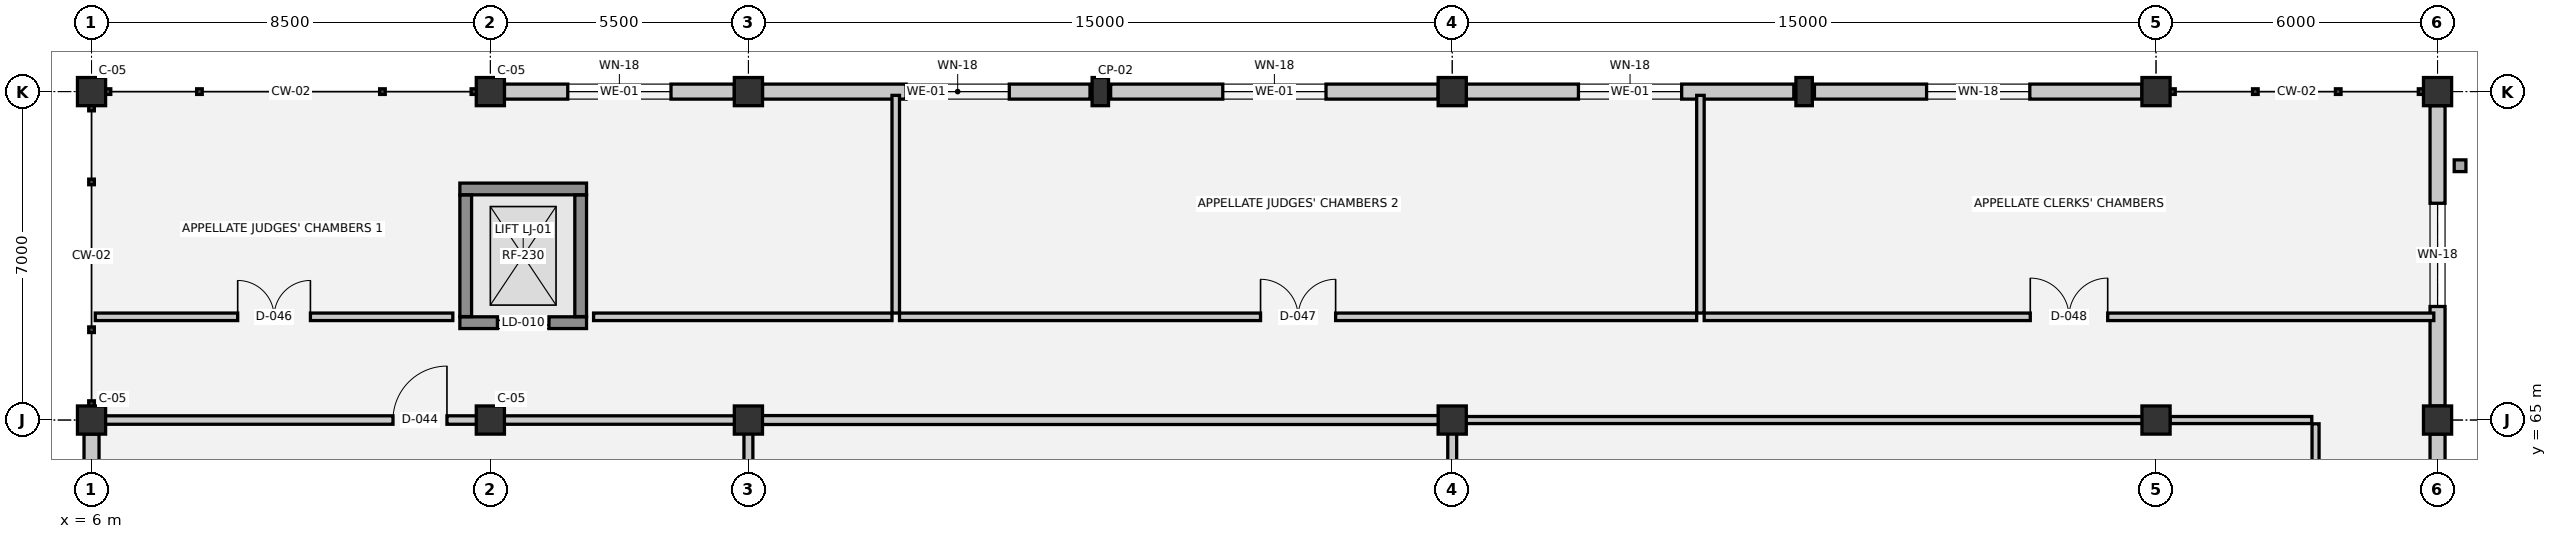
"""IFC4 building model, lengths in metres.
Left out: names, types, materials, properties, quantities, classifications, styles, units other than length and angle.
Written with IfcOpenShell. Run it as: python <this file> out.ifc"""

import sys

from ifc_helpers import new_model, si_unit, direction, frame, frame_2d, origin, origin_2d, place, context, subcontext, project, spatial, rectangle, extrude, element, fill, save


model = new_model("IFC4")
c1 = context("Model", 3, precision=1e-05, world=origin(), true_north=direction((0.0, 1.0)))
c2 = subcontext(c1, "Body", "Model", "MODEL_VIEW")
j1 = project(units=[si_unit("LENGTHUNIT", "METRE"), si_unit("PLANEANGLEUNIT", "RADIAN")], contexts=[c1])
p1 = place(None, origin())
s1 = spatial("IfcSite", under=j1, at=p1, CompositionType="ELEMENT")
p2 = place(p1, origin())
s2 = spatial("IfcBuilding", under=s1, at=p2, CompositionType="ELEMENT")
p3 = place(p2, frame((0.0, 0.0, 14.4)))
s3 = spatial("IfcBuildingStorey", under=s2, at=p3, CompositionType="ELEMENT", Elevation=14.4)
for number, where, z_axis, x_axis in (
    (1, (6.0, 65.0, 0.0), (0.0, 0.0, 1.0), (1.0, 0.0, 0.0)),
    (2, (6.0, 72.0, 0.0), (0.0, 0.0, 1.0), (1.0, 0.0, 0.0)),
    (3, (14.5, 65.0, 0.0), (0.0, 0.0, 1.0), (1.0, 0.0, 0.0)),
    (4, (14.5, 72.0, 0.0), (0.0, 0.0, 1.0), (1.0, 0.0, 0.0)),
    (5, (20.0, 65.0, 0.0), (0.0, 0.0, 1.0), (1.0, 0.0, 0.0)),
    (6, (20.0, 72.0, 0.0), (0.0, 0.0, 1.0), (1.0, 0.0, 0.0)),
    (7, (35.0, 65.0, 0.0), (0.0, 0.0, 1.0), (1.0, 0.0, 0.0)),
    (8, (35.0, 72.0, 0.0), (0.0, 0.0, 1.0), (1.0, 0.0, 0.0)),
    (9, (50.0, 65.0, 0.0), (0.0, 0.0, 1.0), (1.0, 0.0, 0.0)),
    (10, (50.0, 72.0, 0.0), (0.0, 0.0, 1.0), (1.0, 0.0, 0.0)),
    (11, (56.0, 65.0, 0.0), (0.0, 0.0, 1.0), (1.0, 0.0, 0.0)),
    (12, (56.0, 72.0, 0.0), (0.0, 0.0, 1.0), (1.0, 0.0, 0.0)),
):
    element("IfcColumn", number, at=place(p3, frame(where, z_axis=z_axis, x_axis=x_axis)), inside=s3, PredefinedType="COLUMN", context=c2, shape_type="SweptSolid", body=[
        extrude(rectangle(XDim=0.6, YDim=0.6, at=origin_2d()), origin(), (0.0, 0.0, 1.0), 3.9),
    ])
for number, where, z_axis, x_axis in (
    (13, (27.5, 72.0, 0.0), (0.0, 0.0, 1.0), (1.0, 0.0, 0.0)),
    (14, (42.5, 72.0, 0.0), (0.0, 0.0, 1.0), (1.0, 0.0, 0.0)),
):
    element("IfcColumn", number, at=place(p3, frame(where, z_axis=z_axis, x_axis=x_axis)), inside=s3, PredefinedType="PILASTER", context=c2, shape_type="SweptSolid", body=[
        extrude(rectangle(XDim=0.35, YDim=0.6, at=origin_2d()), origin(), (0.0, 0.0, 1.0), 3.9),
    ])
p4 = place(p3, frame((6.0, 51.3, 0.0), z_axis=(0.0, 0.0, 1.0), x_axis=(0.0, 1.0, 0.0)))
e15 = element("IfcWall", 15, at=p4, inside=s3, PredefinedType="SOLIDWALL", context=c2, shape_type="SweptSolid", body=[
    extrude(rectangle(XDim=13.4, YDim=0.32, at=frame_2d((6.7, 0.0))), origin(), (0.0, 0.0, 1.0), 2.46),
])
p5 = place(p4, frame((5.6, 0.0, 0.9)))
e16 = element("IfcOpeningElement", 16, at=p5, cuts=e15, PredefinedType="OPENING", context=c2, shape_type="SweptSolid", body=[
    extrude(rectangle(XDim=2.2, YDim=1.0, at=frame_2d((1.1, 0.5))), frame((0.0, 0.17, 0.0), z_axis=(0.0, -1.0, 0.0), x_axis=(1.0, 0.0, 0.0)), (0.0, 0.0, 1.0), 0.34),
])
p6 = place(p3, frame((14.8, 72.0, 0.0), z_axis=(0.0, 0.0, 1.0), x_axis=(1.0, 0.0, 0.0)))
e17 = element("IfcWall", 17, at=p6, inside=s3, PredefinedType="SOLIDWALL", context=c2, shape_type="SweptSolid", body=[
    extrude(rectangle(XDim=4.9, YDim=0.32, at=frame_2d((2.45, 0.0))), origin(), (0.0, 0.0, 1.0), 2.46),
])
p7 = place(p6, frame((1.35, 0.0, 0.9)))
e18 = element("IfcOpeningElement", 18, at=p7, cuts=e17, PredefinedType="OPENING", context=c2, shape_type="SweptSolid", body=[
    extrude(rectangle(XDim=2.2, YDim=1.0, at=frame_2d((1.1, 0.5))), frame((0.0, 0.17, 0.0), z_axis=(0.0, -1.0, 0.0), x_axis=(1.0, 0.0, 0.0)), (0.0, 0.0, 1.0), 0.34),
])
p8 = place(p3, frame((20.3, 72.0, 0.0), z_axis=(0.0, 0.0, 1.0), x_axis=(1.0, 0.0, 0.0)))
e19 = element("IfcWall", 19, at=p8, inside=s3, PredefinedType="SOLIDWALL", context=c2, shape_type="SweptSolid", body=[
    extrude(rectangle(XDim=6.98, YDim=0.32, at=frame_2d((3.49, 0.0))), origin(), (0.0, 0.0, 1.0), 2.46),
])
p9 = place(p8, frame((3.06, 0.0, 0.9)))
e20 = element("IfcOpeningElement", 20, at=p9, cuts=e19, PredefinedType="OPENING", context=c2, shape_type="SweptSolid", body=[
    extrude(rectangle(XDim=2.2, YDim=1.0, at=frame_2d((1.1, 0.5))), frame((0.0, 0.17, 0.0), z_axis=(0.0, -1.0, 0.0), x_axis=(1.0, 0.0, 0.0)), (0.0, 0.0, 1.0), 0.34),
])
p10 = place(p3, frame((27.72, 72.0, 0.0), z_axis=(0.0, 0.0, 1.0), x_axis=(1.0, 0.0, 0.0)))
e21 = element("IfcWall", 21, at=p10, inside=s3, PredefinedType="SOLIDWALL", context=c2, shape_type="SweptSolid", body=[
    extrude(rectangle(XDim=6.98, YDim=0.32, at=frame_2d((3.49, 0.0))), origin(), (0.0, 0.0, 1.0), 2.46),
])
p11 = place(p10, frame((2.39, 0.0, 0.9)))
e22 = element("IfcOpeningElement", 22, at=p11, cuts=e21, PredefinedType="OPENING", context=c2, shape_type="SweptSolid", body=[
    extrude(rectangle(XDim=2.2, YDim=1.0, at=frame_2d((1.1, 0.5))), frame((0.0, 0.17, 0.0), z_axis=(0.0, -1.0, 0.0), x_axis=(1.0, 0.0, 0.0)), (0.0, 0.0, 1.0), 0.34),
])
p12 = place(p3, frame((35.3, 72.0, 0.0), z_axis=(0.0, 0.0, 1.0), x_axis=(1.0, 0.0, 0.0)))
e23 = element("IfcWall", 23, at=p12, inside=s3, PredefinedType="SOLIDWALL", context=c2, shape_type="SweptSolid", body=[
    extrude(rectangle(XDim=6.98, YDim=0.32, at=frame_2d((3.49, 0.0))), origin(), (0.0, 0.0, 1.0), 2.46),
])
p13 = place(p12, frame((2.39, 0.0, 0.9)))
e24 = element("IfcOpeningElement", 24, at=p13, cuts=e23, PredefinedType="OPENING", context=c2, shape_type="SweptSolid", body=[
    extrude(rectangle(XDim=2.2, YDim=1.0, at=frame_2d((1.1, 0.5))), frame((0.0, 0.17, 0.0), z_axis=(0.0, -1.0, 0.0), x_axis=(1.0, 0.0, 0.0)), (0.0, 0.0, 1.0), 0.34),
])
p14 = place(p3, frame((42.72, 72.0, 0.0), z_axis=(0.0, 0.0, 1.0), x_axis=(1.0, 0.0, 0.0)))
e25 = element("IfcWall", 25, at=p14, inside=s3, PredefinedType="SOLIDWALL", context=c2, shape_type="SweptSolid", body=[
    extrude(rectangle(XDim=6.98, YDim=0.32, at=frame_2d((3.49, 0.0))), origin(), (0.0, 0.0, 1.0), 2.46),
])
p15 = place(p14, frame((2.39, 0.0, 0.9)))
e26 = element("IfcOpeningElement", 26, at=p15, cuts=e25, PredefinedType="OPENING", context=c2, shape_type="SweptSolid", body=[
    extrude(rectangle(XDim=2.2, YDim=1.0, at=frame_2d((1.1, 0.5))), frame((0.0, 0.17, 0.0), z_axis=(0.0, -1.0, 0.0), x_axis=(1.0, 0.0, 0.0)), (0.0, 0.0, 1.0), 0.34),
])
p16 = place(p3, frame((56.0, 71.7, 0.0), z_axis=(0.0, 0.0, 1.0), x_axis=(0.0, -1.0, 0.0)))
e27 = element("IfcWall", 27, at=p16, inside=s3, PredefinedType="SOLIDWALL", context=c2, shape_type="SweptSolid", body=[
    extrude(rectangle(XDim=6.4, YDim=0.32, at=frame_2d((3.2, 0.0))), origin(), (0.0, 0.0, 1.0), 2.46),
])
p17 = place(p16, frame((2.08, 0.0, 0.9)))
e28 = element("IfcOpeningElement", 28, at=p17, cuts=e27, PredefinedType="OPENING", context=c2, shape_type="SweptSolid", body=[
    extrude(rectangle(XDim=2.2, YDim=1.0, at=frame_2d((1.1, 0.5))), frame((0.0, 0.17, 0.0), z_axis=(0.0, -1.0, 0.0), x_axis=(1.0, 0.0, 0.0)), (0.0, 0.0, 1.0), 0.34),
])
p18 = place(p3, frame((56.0, 64.7, 0.0), z_axis=(0.0, 0.0, 1.0), x_axis=(0.0, -1.0, 0.0)))
e29 = element("IfcWall", 29, at=p18, inside=s3, PredefinedType="SOLIDWALL", context=c2, shape_type="SweptSolid", body=[
    extrude(rectangle(XDim=13.4, YDim=0.32, at=frame_2d((6.7, 0.0))), origin(), (0.0, 0.0, 1.0), 2.46),
])
p19 = place(p18, frame((9.975, 0.0, 0.0)))
e30 = element("IfcOpeningElement", 30, at=p19, cuts=e29, PredefinedType="OPENING", context=c2, shape_type="SweptSolid", body=[
    extrude(rectangle(XDim=1.65, YDim=2.2, at=frame_2d((0.825, 1.1))), frame((0.0, 0.17, 0.0), z_axis=(0.0, -1.0, 0.0), x_axis=(1.0, 0.0, 0.0)), (0.0, 0.0, 1.0), 0.34),
])
p20 = place(p3, frame((13.85, 67.075, 0.0), z_axis=(0.0, 0.0, 1.0), x_axis=(1.0, 0.0, 0.0)))
e31 = element("IfcWall", 31, at=p20, inside=s3, PredefinedType="SHEAR", context=c2, shape_type="SweptSolid", body=[
    extrude(rectangle(XDim=2.7, YDim=0.25, at=frame_2d((1.35, 0.0))), origin(), (0.0, 0.0, 1.0), 3.27),
])
p21 = place(p20, frame((0.8, 0.0, 0.0)))
e32 = element("IfcOpeningElement", 32, at=p21, cuts=e31, PredefinedType="OPENING", context=c2, shape_type="SweptSolid", body=[
    extrude(rectangle(XDim=1.1, YDim=2.15, at=frame_2d((0.55, 1.075))), frame((0.0, 0.135, 0.0), z_axis=(0.0, -1.0, 0.0), x_axis=(1.0, 0.0, 0.0)), (0.0, 0.0, 1.0), 0.27),
])
p22 = place(p3, frame((16.55, 69.925, 0.0), z_axis=(0.0, 0.0, 1.0), x_axis=(-1.0, 0.0, 0.0)))
e33 = element("IfcWall", 33, at=p22, inside=s3, PredefinedType="SHEAR", context=c2, shape_type="SweptSolid", body=[
    extrude(rectangle(XDim=2.7, YDim=0.25, at=frame_2d((1.35, 0.0))), origin(), (0.0, 0.0, 1.0), 3.27),
])
for number, where, z_axis, x_axis in (
    (34, (13.975, 69.795, 0.0), (0.0, 0.0, 1.0), (0.0, -1.0, 0.0)),
    (35, (16.425, 67.205, 0.0), (0.0, 0.0, 1.0), (0.0, 1.0, 0.0)),
):
    element("IfcWall", number, at=place(p3, frame(where, z_axis=z_axis, x_axis=x_axis)), inside=s3, PredefinedType="SHEAR", context=c2, shape_type="SweptSolid", body=[
        extrude(rectangle(XDim=2.59, YDim=0.25, at=frame_2d((1.295, 0.0))), origin(), (0.0, 0.0, 1.0), 3.27),
    ])
p23 = place(p3, frame((6.08, 65.0, 0.0), z_axis=(0.0, 0.0, 1.0), x_axis=(1.0, 0.0, 0.0)))
e36 = element("IfcWall", 36, at=p23, inside=s3, PredefinedType="PARTITIONING", context=c2, shape_type="SweptSolid", body=[
    extrude(rectangle(XDim=13.84, YDim=0.18, at=frame_2d((6.92, 0.0))), origin(), (0.0, 0.0, 1.0), 2.83),
])
p24 = place(p23, frame((6.345, 0.0, 0.0)))
e37 = element("IfcOpeningElement", 37, at=p24, cuts=e36, PredefinedType="OPENING", context=c2, shape_type="SweptSolid", body=[
    extrude(rectangle(XDim=1.15, YDim=2.2, at=frame_2d((0.575, 1.1))), frame((0.0, 0.1, 0.0), z_axis=(0.0, -1.0, 0.0), x_axis=(1.0, 0.0, 0.0)), (0.0, 0.0, 1.0), 0.2),
])
p25 = place(p3, frame((20.08, 65.0, 0.0), z_axis=(0.0, 0.0, 1.0), x_axis=(1.0, 0.0, 0.0)))
e38 = element("IfcWall", 38, at=p25, inside=s3, PredefinedType="PARTITIONING", context=c2, shape_type="SweptSolid", body=[
    extrude(rectangle(XDim=14.84, YDim=0.19, at=frame_2d((7.42, 0.0))), origin(), (0.0, 0.0, 1.0), 2.63),
])
p26 = place(p3, frame((35.08, 65.0, 0.0), z_axis=(0.0, 0.0, 1.0), x_axis=(1.0, 0.0, 0.0)))
e39 = element("IfcWall", 39, at=p26, inside=s3, PredefinedType="PARTITIONING", context=c2, shape_type="SweptSolid", body=[
    extrude(rectangle(XDim=15.22, YDim=0.15, at=frame_2d((7.61, 0.0))), origin(), (0.0, 0.0, 1.0), 2.63),
])
p27 = place(p3, frame((50.3, 65.0, 0.0), z_axis=(0.0, 0.0, 1.0), x_axis=(1.0, 0.0, 0.0)))
e40 = element("IfcWall", 40, at=p27, inside=s3, PredefinedType="PARTITIONING", context=c2, shape_type="SweptSolid", body=[
    extrude(rectangle(XDim=3.02, YDim=0.15, at=frame_2d((1.51, 0.0))), origin(), (0.0, 0.0, 1.0), 2.83),
])
p28 = place(p3, frame((6.08, 67.2, 0.0), z_axis=(0.0, 0.0, 1.0), x_axis=(1.0, 0.0, 0.0)))
e41 = element("IfcWall", 41, at=p28, inside=s3, PredefinedType="PARTITIONING", context=c2, shape_type="SweptSolid", body=[
    extrude(rectangle(XDim=7.62, YDim=0.16, at=frame_2d((3.81, 0.0))), origin(), (0.0, 0.0, 1.0), 3.54),
])
p29 = place(p28, frame((3.035, 0.0, 0.0)))
e42 = element("IfcOpeningElement", 42, at=p29, cuts=e41, PredefinedType="OPENING", context=c2, shape_type="SweptSolid", body=[
    extrude(rectangle(XDim=1.55, YDim=2.25, at=frame_2d((0.775, 1.125))), frame((0.0, 0.09, 0.0), z_axis=(0.0, -1.0, 0.0), x_axis=(1.0, 0.0, 0.0)), (0.0, 0.0, 1.0), 0.18),
])
p30 = place(p3, frame((16.7, 67.2, 0.0), z_axis=(0.0, 0.0, 1.0), x_axis=(1.0, 0.0, 0.0)))
e43 = element("IfcWall", 43, at=p30, inside=s3, PredefinedType="PARTITIONING", context=c2, shape_type="SweptSolid", body=[
    extrude(rectangle(XDim=6.36, YDim=0.16, at=frame_2d((3.18, 0.0))), origin(), (0.0, 0.0, 1.0), 3.54),
])
p31 = place(p3, frame((23.22, 67.2, 0.0), z_axis=(0.0, 0.0, 1.0), x_axis=(1.0, 0.0, 0.0)))
e44 = element("IfcWall", 44, at=p31, inside=s3, PredefinedType="PARTITIONING", context=c2, shape_type="SweptSolid", body=[
    extrude(rectangle(XDim=16.99, YDim=0.16, at=frame_2d((8.495, 0.0))), origin(), (0.0, 0.0, 1.0), 3.54),
])
p32 = place(p31, frame((7.695, 0.0, 0.0)))
e45 = element("IfcOpeningElement", 45, at=p32, cuts=e44, PredefinedType="OPENING", context=c2, shape_type="SweptSolid", body=[
    extrude(rectangle(XDim=1.6, YDim=2.25, at=frame_2d((0.8, 1.125))), frame((0.0, 0.09, 0.0), z_axis=(0.0, -1.0, 0.0), x_axis=(1.0, 0.0, 0.0)), (0.0, 0.0, 1.0), 0.18),
])
p33 = place(p3, frame((40.37, 67.2, 0.0), z_axis=(0.0, 0.0, 1.0), x_axis=(1.0, 0.0, 0.0)))
e46 = element("IfcWall", 46, at=p33, inside=s3, PredefinedType="PARTITIONING", context=c2, shape_type="SweptSolid", body=[
    extrude(rectangle(XDim=15.55, YDim=0.16, at=frame_2d((7.775, 0.0))), origin(), (0.0, 0.0, 1.0), 3.54),
])
p34 = place(p33, frame((6.95, 0.0, 0.0)))
e47 = element("IfcOpeningElement", 47, at=p34, cuts=e46, PredefinedType="OPENING", context=c2, shape_type="SweptSolid", body=[
    extrude(rectangle(XDim=1.65, YDim=2.3, at=frame_2d((0.825, 1.15))), frame((0.0, 0.09, 0.0), z_axis=(0.0, -1.0, 0.0), x_axis=(1.0, 0.0, 0.0)), (0.0, 0.0, 1.0), 0.18),
])
p35 = place(p3, frame((20.0, 51.08, 0.0), z_axis=(0.0, 0.0, 1.0), x_axis=(0.0, 1.0, 0.0)))
e48 = element("IfcWall", 48, at=p35, inside=s3, PredefinedType="PARTITIONING", context=c2, shape_type="SweptSolid", body=[
    extrude(rectangle(XDim=13.84, YDim=0.19, at=frame_2d((6.92, 0.0))), origin(), (0.0, 0.0, 1.0), 2.48),
])
p36 = place(p3, frame((23.14, 67.28, 0.0), z_axis=(0.0, 0.0, 1.0), x_axis=(0.0, 1.0, 0.0)))
e49 = element("IfcWall", 49, at=p36, inside=s3, PredefinedType="PARTITIONING", context=c2, shape_type="SweptSolid", body=[
    extrude(rectangle(XDim=4.64, YDim=0.16, at=frame_2d((2.32, 0.0))), origin(), (0.0, 0.0, 1.0), 3.54),
])
p37 = place(p3, frame((35.0, 51.08, 0.0), z_axis=(0.0, 0.0, 1.0), x_axis=(0.0, 1.0, 0.0)))
e50 = element("IfcWall", 50, at=p37, inside=s3, PredefinedType="PARTITIONING", context=c2, shape_type="SweptSolid", body=[
    extrude(rectangle(XDim=13.84, YDim=0.19, at=frame_2d((6.92, 0.0))), origin(), (0.0, 0.0, 1.0), 2.48),
])
p38 = place(p3, frame((40.29, 67.28, 0.0), z_axis=(0.0, 0.0, 1.0), x_axis=(0.0, 1.0, 0.0)))
e51 = element("IfcWall", 51, at=p38, inside=s3, PredefinedType="PARTITIONING", context=c2, shape_type="SweptSolid", body=[
    extrude(rectangle(XDim=4.64, YDim=0.16, at=frame_2d((2.32, 0.0))), origin(), (0.0, 0.0, 1.0), 3.54),
])
p39 = place(p3, frame((53.4, 51.08, 0.0), z_axis=(0.0, 0.0, 1.0), x_axis=(0.0, 1.0, 0.0)))
e52 = element("IfcWall", 52, at=p39, inside=s3, PredefinedType="PARTITIONING", context=c2, shape_type="SweptSolid", body=[
    extrude(rectangle(XDim=13.84, YDim=0.15, at=frame_2d((6.92, 0.0))), origin(), (0.0, 0.0, 1.0), 3.54),
])
p40 = place(p7, origin())
e53 = element("IfcWindow", 53, at=p40, inside=s3, PartitioningType="SINGLE_PANEL", PredefinedType="WINDOW", context=c2, shape_type="SweptSolid", body=[
    extrude(rectangle(XDim=2.2, YDim=1.0, at=frame_2d((1.1, 0.5))), frame((0.0, 0.03, 0.0), z_axis=(0.0, -1.0, 0.0), x_axis=(1.0, 0.0, 0.0)), (0.0, 0.0, 1.0), 0.06),
])
fill(e18, e53)
p41 = place(p9, origin())
e54 = element("IfcWindow", 54, at=p41, inside=s3, PartitioningType="SINGLE_PANEL", PredefinedType="WINDOW", context=c2, shape_type="SweptSolid", body=[
    extrude(rectangle(XDim=2.2, YDim=1.0, at=frame_2d((1.1, 0.5))), frame((0.0, 0.03, 0.0), z_axis=(0.0, -1.0, 0.0), x_axis=(1.0, 0.0, 0.0)), (0.0, 0.0, 1.0), 0.06),
])
fill(e20, e54)
p42 = place(p11, origin())
e55 = element("IfcWindow", 55, at=p42, inside=s3, PartitioningType="SINGLE_PANEL", PredefinedType="WINDOW", context=c2, shape_type="SweptSolid", body=[
    extrude(rectangle(XDim=2.2, YDim=1.0, at=frame_2d((1.1, 0.5))), frame((0.0, 0.03, 0.0), z_axis=(0.0, -1.0, 0.0), x_axis=(1.0, 0.0, 0.0)), (0.0, 0.0, 1.0), 0.06),
])
fill(e22, e55)
p43 = place(p13, origin())
e56 = element("IfcWindow", 56, at=p43, inside=s3, PartitioningType="SINGLE_PANEL", PredefinedType="WINDOW", context=c2, shape_type="SweptSolid", body=[
    extrude(rectangle(XDim=2.2, YDim=1.0, at=frame_2d((1.1, 0.5))), frame((0.0, 0.03, 0.0), z_axis=(0.0, -1.0, 0.0), x_axis=(1.0, 0.0, 0.0)), (0.0, 0.0, 1.0), 0.06),
])
fill(e24, e56)
p44 = place(p15, origin())
e57 = element("IfcWindow", 57, at=p44, inside=s3, PartitioningType="SINGLE_PANEL", PredefinedType="WINDOW", context=c2, shape_type="SweptSolid", body=[
    extrude(rectangle(XDim=2.2, YDim=1.0, at=frame_2d((1.1, 0.5))), frame((0.0, 0.03, 0.0), z_axis=(0.0, -1.0, 0.0), x_axis=(1.0, 0.0, 0.0)), (0.0, 0.0, 1.0), 0.06),
])
fill(e26, e57)
p45 = place(p17, origin())
e58 = element("IfcWindow", 58, at=p45, inside=s3, PartitioningType="SINGLE_PANEL", PredefinedType="WINDOW", context=c2, shape_type="SweptSolid", body=[
    extrude(rectangle(XDim=2.2, YDim=1.0, at=frame_2d((1.1, 0.5))), frame((0.0, 0.03, 0.0), z_axis=(0.0, -1.0, 0.0), x_axis=(1.0, 0.0, 0.0)), (0.0, 0.0, 1.0), 0.06),
])
fill(e28, e58)
p46 = place(p21, origin())
e59 = element("IfcDoor", 59, at=p46, inside=s3, OperationType="DOUBLE_DOOR_SLIDING", PredefinedType="DOOR", context=c2, shape_type="SweptSolid", body=[
    extrude(rectangle(XDim=1.1, YDim=2.15, at=frame_2d((0.55, 1.075))), frame((0.0, 0.025, 0.0), z_axis=(0.0, -1.0, 0.0), x_axis=(1.0, 0.0, 0.0)), (0.0, 0.0, 1.0), 0.05),
])
fill(e32, e59)
p47 = place(p24, origin())
e60 = element("IfcDoor", 60, at=p47, inside=s3, OperationType="SINGLE_SWING_RIGHT", PredefinedType="DOOR", context=c2, shape_type="SweptSolid", body=[
    extrude(rectangle(XDim=1.15, YDim=2.2, at=frame_2d((0.575, 1.1))), frame((0.0, 0.025, 0.0), z_axis=(0.0, -1.0, 0.0), x_axis=(1.0, 0.0, 0.0)), (0.0, 0.0, 1.0), 0.05),
])
fill(e37, e60)
p48 = place(p29, origin())
e61 = element("IfcDoor", 61, at=p48, inside=s3, OperationType="DOUBLE_DOOR_SINGLE_SWING", PredefinedType="DOOR", context=c2, shape_type="SweptSolid", body=[
    extrude(rectangle(XDim=1.55, YDim=2.25, at=frame_2d((0.775, 1.125))), frame((0.0, 0.025, 0.0), z_axis=(0.0, -1.0, 0.0), x_axis=(1.0, 0.0, 0.0)), (0.0, 0.0, 1.0), 0.05),
])
fill(e42, e61)
p49 = place(p32, origin())
e62 = element("IfcDoor", 62, at=p49, inside=s3, OperationType="DOUBLE_DOOR_SINGLE_SWING", PredefinedType="DOOR", context=c2, shape_type="SweptSolid", body=[
    extrude(rectangle(XDim=1.6, YDim=2.25, at=frame_2d((0.8, 1.125))), frame((0.0, 0.025, 0.0), z_axis=(0.0, -1.0, 0.0), x_axis=(1.0, 0.0, 0.0)), (0.0, 0.0, 1.0), 0.05),
])
fill(e45, e62)
p50 = place(p34, origin())
e63 = element("IfcDoor", 63, at=p50, inside=s3, OperationType="DOUBLE_DOOR_SINGLE_SWING", PredefinedType="DOOR", context=c2, shape_type="SweptSolid", body=[
    extrude(rectangle(XDim=1.65, YDim=2.3, at=frame_2d((0.825, 1.15))), frame((0.0, 0.025, 0.0), z_axis=(0.0, -1.0, 0.0), x_axis=(1.0, 0.0, 0.0)), (0.0, 0.0, 1.0), 0.05),
])
fill(e47, e63)
save(model, sys.argv[1])
